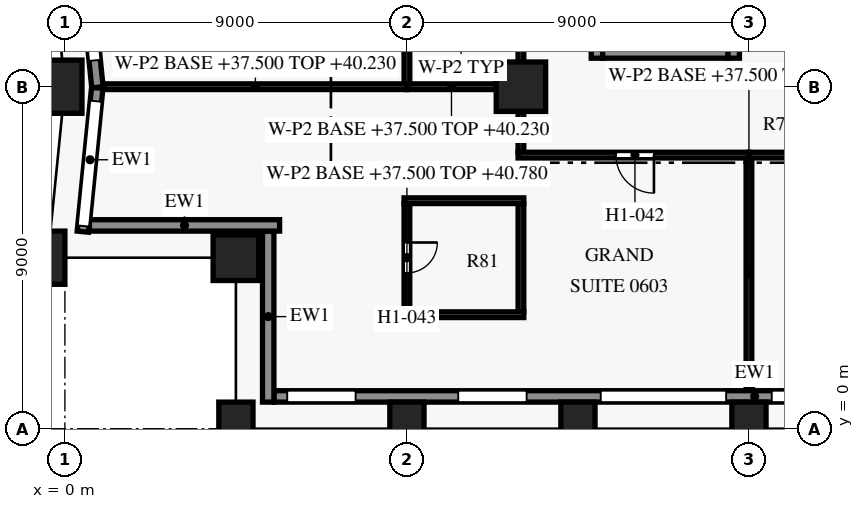
"""IFC4 building model, lengths in metres.
Left out: names, types, materials, properties, quantities, classifications, styles, units other than length and angle.
Written with IfcOpenShell. Run it as: python <this file> out.ifc"""

import sys

from ifc_helpers import new_model, si_unit, direction, frame, frame_2d, origin, origin_2d, place, context, subcontext, project, spatial, rectangle, extrude, element, fill, save


model = new_model("IFC4")
c1 = context("Model", 3, precision=1e-05, world=origin(), true_north=direction((0.0, 1.0)))
c2 = subcontext(c1, "Body", "Model", "MODEL_VIEW")
j1 = project(units=[si_unit("LENGTHUNIT", "METRE"), si_unit("PLANEANGLEUNIT", "RADIAN")], contexts=[c1])
p1 = place(None, origin())
s1 = spatial("IfcSite", under=j1, at=p1, CompositionType="ELEMENT")
p2 = place(p1, origin())
s2 = spatial("IfcBuilding", under=s1, at=p2, CompositionType="ELEMENT")
p3 = place(p2, frame((0.0, 0.0, 37.5)))
s3 = spatial("IfcBuildingStorey", under=s2, at=p3, CompositionType="ELEMENT", Elevation=37.5)
for number, where, z_axis, x_axis in (
    (1, (4.5, 0.0, 0.0), (0.0, 0.0, 1.0), (1.0, 0.0, 0.0)),
    (2, (9.0, 0.0, 0.0), (0.0, 0.0, 1.0), (1.0, 0.0, 0.0)),
    (3, (13.5, 0.0, 0.0), (0.0, 0.0, 1.0), (1.0, 0.0, 0.0)),
    (4, (18.0, 0.0, 0.0), (0.0, 0.0, 1.0), (1.0, 0.0, 0.0)),
    (5, (0.0, 9.0, 0.0), (0.0, 0.0, 1.0), (0.0, -1.0, 0.0)),
    (6, (-0.45, 4.5, 0.0), (0.0, 0.0, 1.0), (-0.1, -0.995, 0.0)),
):
    element("IfcColumn", number, at=place(p3, frame(where, z_axis=z_axis, x_axis=x_axis)), inside=s3, PredefinedType="COLUMN", context=c2, shape_type="SweptSolid", body=[
        extrude(rectangle(XDim=0.9, YDim=1.4, at=origin_2d()), origin(), (0.0, 0.0, 1.0), 3.6),
    ])
p4 = place(p3, frame((4.5, 4.5, 0.0), z_axis=(0.0, 0.0, 1.0), x_axis=(1.0, 0.0, 0.0)))
e7 = element("IfcColumn", 7, at=p4, inside=s3, PredefinedType="COLUMN", context=c2, shape_type="SweptSolid", body=[
    extrude(rectangle(XDim=1.2, YDim=1.2, at=origin_2d()), origin(), (0.0, 0.0, 1.0), 3.6),
])
p5 = place(p3, frame((12.0, 9.0, 0.0), z_axis=(0.0, 0.0, 1.0), x_axis=(1.0, 0.0, 0.0)))
e8 = element("IfcColumn", 8, at=p5, inside=s3, PredefinedType="COLUMN", context=c2, shape_type="SweptSolid", body=[
    extrude(rectangle(XDim=1.3, YDim=1.3, at=origin_2d()), origin(), (0.0, 0.0, 1.0), 3.6),
])
p6 = place(p3, frame((30.8, 0.85, 0.0), z_axis=(0.0, 0.0, 1.0), x_axis=(-1.0, 0.0, 0.0)))
e9 = element("IfcWall", 9, at=p6, inside=s3, PredefinedType="SOLIDWALL", context=c2, shape_type="SweptSolid", body=[
    extrude(rectangle(XDim=25.3, YDim=0.3, at=frame_2d((12.65, 0.0))), origin(), (0.0, 0.0, 1.0), 2.95),
])
p7 = place(p6, frame((0.65, 0.0, 0.75)))
e10 = element("IfcOpeningElement", 10, at=p7, cuts=e9, PredefinedType="OPENING", context=c2, shape_type="SweptSolid", body=[
    extrude(rectangle(XDim=1.8, YDim=1.8, at=frame_2d((0.9, 0.9))), frame((0.0, 0.16, 0.0), z_axis=(0.0, -1.0, 0.0), x_axis=(1.0, 0.0, 0.0)), (0.0, 0.0, 1.0), 0.32),
])
p8 = place(p6, frame((5.15, 0.0, 0.75)))
e11 = element("IfcOpeningElement", 11, at=p8, cuts=e9, PredefinedType="OPENING", context=c2, shape_type="SweptSolid", body=[
    extrude(rectangle(XDim=1.8, YDim=1.8, at=frame_2d((0.9, 0.9))), frame((0.0, 0.16, 0.0), z_axis=(0.0, -1.0, 0.0), x_axis=(1.0, 0.0, 0.0)), (0.0, 0.0, 1.0), 0.32),
])
p9 = place(p6, frame((8.9, 0.0, 0.15)))
e12 = element("IfcOpeningElement", 12, at=p9, cuts=e9, PredefinedType="OPENING", context=c2, shape_type="SweptSolid", body=[
    extrude(rectangle(XDim=3.3, YDim=2.4, at=frame_2d((1.65, 1.2))), frame((0.0, 0.16, 0.0), z_axis=(0.0, -1.0, 0.0), x_axis=(1.0, 0.0, 0.0)), (0.0, 0.0, 1.0), 0.32),
])
p10 = place(p6, frame((13.4, 0.0, 0.15)))
e13 = element("IfcOpeningElement", 13, at=p10, cuts=e9, PredefinedType="OPENING", context=c2, shape_type="SweptSolid", body=[
    extrude(rectangle(XDim=3.3, YDim=2.4, at=frame_2d((1.65, 1.2))), frame((0.0, 0.16, 0.0), z_axis=(0.0, -1.0, 0.0), x_axis=(1.0, 0.0, 0.0)), (0.0, 0.0, 1.0), 0.32),
])
p11 = place(p6, frame((18.65, 0.0, 0.75)))
e14 = element("IfcOpeningElement", 14, at=p11, cuts=e9, PredefinedType="OPENING", context=c2, shape_type="SweptSolid", body=[
    extrude(rectangle(XDim=1.8, YDim=1.8, at=frame_2d((0.9, 0.9))), frame((0.0, 0.16, 0.0), z_axis=(0.0, -1.0, 0.0), x_axis=(1.0, 0.0, 0.0)), (0.0, 0.0, 1.0), 0.32),
])
p12 = place(p6, frame((23.15, 0.0, 0.75)))
e15 = element("IfcOpeningElement", 15, at=p12, cuts=e9, PredefinedType="OPENING", context=c2, shape_type="SweptSolid", body=[
    extrude(rectangle(XDim=1.8, YDim=1.8, at=frame_2d((0.9, 0.9))), frame((0.0, 0.16, 0.0), z_axis=(0.0, -1.0, 0.0), x_axis=(1.0, 0.0, 0.0)), (0.0, 0.0, 1.0), 0.32),
])
p13 = place(p3, frame((0.856, 8.985, 0.0), z_axis=(0.0, 0.0, 1.0), x_axis=(-0.099495688264, 0.995037993253, 0.0)))
e16 = element("IfcWall", 16, at=p13, inside=s3, PredefinedType="SOLIDWALL", context=c2, shape_type="SweptSolid", body=[
    extrude(rectangle(XDim=9.03, YDim=0.3, at=frame_2d((4.515, 0.0))), origin(), (0.0, 0.0, 1.0), 2.95),
])
p14 = place(p13, frame((0.711, 0.0, 0.15)))
e17 = element("IfcOpeningElement", 17, at=p14, cuts=e16, PredefinedType="OPENING", context=c2, shape_type="SweptSolid", body=[
    extrude(rectangle(XDim=3.3, YDim=2.4, at=frame_2d((1.65, 1.2))), frame((0.0, 0.16, 0.0), z_axis=(0.0, -1.0, 0.0), x_axis=(1.0, 0.0, 0.0)), (0.0, 0.0, 1.0), 0.32),
])
p15 = place(p13, frame((5.984, 0.0, 0.75)))
e18 = element("IfcOpeningElement", 18, at=p15, cuts=e16, PredefinedType="OPENING", context=c2, shape_type="SweptSolid", body=[
    extrude(rectangle(XDim=1.8, YDim=1.8, at=frame_2d((0.9, 0.9))), frame((0.0, 0.16, 0.0), z_axis=(0.0, -1.0, 0.0), x_axis=(1.0, 0.0, 0.0)), (0.0, 0.0, 1.0), 0.32),
])
p16 = place(p3, frame((0.473, 5.185, 0.0), z_axis=(0.0, 0.0, 1.0), x_axis=(0.099541845169, 0.995033376857, 0.0)))
e19 = element("IfcWall", 19, at=p16, inside=s3, PredefinedType="SOLIDWALL", context=c2, shape_type="SweptSolid", body=[
    extrude(rectangle(XDim=3.804, YDim=0.3, at=frame_2d((1.902, 0.0))), origin(), (0.0, 0.0, 1.0), 2.95),
])
p17 = place(p16, frame((0.15, 0.0, 0.15)))
e20 = element("IfcOpeningElement", 20, at=p17, cuts=e19, PredefinedType="OPENING", context=c2, shape_type="SweptSolid", body=[
    extrude(rectangle(XDim=3.3, YDim=2.4, at=frame_2d((1.65, 1.2))), frame((0.0, 0.16, 0.0), z_axis=(0.0, -1.0, 0.0), x_axis=(1.0, 0.0, 0.0)), (0.0, 0.0, 1.0), 0.32),
])
p18 = place(p3, frame((5.65, 5.35, 0.0), z_axis=(0.0, 0.0, 1.0), x_axis=(-1.0, 0.0, 0.0)))
e21 = element("IfcWall", 21, at=p18, inside=s3, PredefinedType="SOLIDWALL", context=c2, shape_type="SweptSolid", body=[
    extrude(rectangle(XDim=5.005, YDim=0.3, at=frame_2d((2.502, 0.0))), origin(), (0.0, 0.0, 1.0), 2.95),
])
p19 = place(p3, frame((5.35, 0.7, 0.0), z_axis=(0.0, 0.0, 1.0), x_axis=(0.0, 1.0, 0.0)))
e22 = element("IfcWall", 22, at=p19, inside=s3, PredefinedType="SOLIDWALL", context=c2, shape_type="SweptSolid", body=[
    extrude(rectangle(XDim=4.5, YDim=0.3, at=frame_2d((2.25, 0.0))), origin(), (0.0, 0.0, 1.0), 2.95),
])
p20 = place(p3, frame((14.15, 9.9, 0.0), z_axis=(0.0, 0.0, 1.0), x_axis=(1.0, 0.0, 0.0)))
e23 = element("IfcWall", 23, at=p20, inside=s3, PredefinedType="SHEAR", context=c2, shape_type="SweptSolid", body=[
    extrude(rectangle(XDim=3.3, YDim=0.3, at=frame_2d((1.65, 0.0))), origin(), (0.0, 0.0, 1.0), 3.3),
])
p21 = place(p3, frame((14.0, 9.75, 0.0), z_axis=(0.0, 0.0, 1.0), x_axis=(0.0, 1.0, 0.0)))
e24 = element("IfcWall", 24, at=p21, inside=s3, PredefinedType="SHEAR", context=c2, shape_type="SweptSolid", body=[
    extrude(rectangle(XDim=8.3, YDim=0.3, at=frame_2d((4.15, 0.0))), origin(), (0.0, 0.0, 1.0), 3.3),
])
p22 = place(p3, frame((17.6, 9.75, 0.0), z_axis=(0.0, 0.0, 1.0), x_axis=(0.0, 1.0, 0.0)))
e25 = element("IfcWall", 25, at=p22, inside=s3, PredefinedType="SHEAR", context=c2, shape_type="SweptSolid", body=[
    extrude(rectangle(XDim=8.3, YDim=0.3, at=frame_2d((4.15, 0.0))), origin(), (0.0, 0.0, 1.0), 3.3),
])
p23 = place(p22, frame((0.65, 0.0, 0.0)))
e26 = element("IfcOpeningElement", 26, at=p23, cuts=e25, PredefinedType="OPENING", context=c2, shape_type="SweptSolid", body=[
    extrude(rectangle(XDim=1.2, YDim=2.2, at=frame_2d((0.6, 1.1))), frame((0.0, 0.16, 0.0), z_axis=(0.0, -1.0, 0.0), x_axis=(1.0, 0.0, 0.0)), (0.0, 0.0, 1.0), 0.32),
])
p24 = place(p3, frame((8.925, 3.0, 0.0), z_axis=(0.0, 0.0, 1.0), x_axis=(1.0, 0.0, 0.0)))
e27 = element("IfcWall", 27, at=p24, inside=s3, PredefinedType="PARTITIONING", context=c2, shape_type="SweptSolid", body=[
    extrude(rectangle(XDim=3.15, YDim=0.15, at=frame_2d((1.575, 0.0))), origin(), (0.0, 0.0, 1.0), 2.58),
])
p25 = place(p3, frame((12.0, 3.075, 0.0), z_axis=(0.0, 0.0, 1.0), x_axis=(0.0, 1.0, 0.0)))
e28 = element("IfcWall", 28, at=p25, inside=s3, PredefinedType="PARTITIONING", context=c2, shape_type="SweptSolid", body=[
    extrude(rectangle(XDim=2.85, YDim=0.15, at=frame_2d((1.425, 0.0))), origin(), (0.0, 0.0, 1.0), 2.58),
])
p26 = place(p3, frame((9.0, 5.925, 0.0), z_axis=(0.0, 0.0, 1.0), x_axis=(0.0, -1.0, 0.0)))
e29 = element("IfcWall", 29, at=p26, inside=s3, PredefinedType="PARTITIONING", context=c2, shape_type="SweptSolid", body=[
    extrude(rectangle(XDim=2.85, YDim=0.15, at=frame_2d((1.425, 0.0))), origin(), (0.0, 0.0, 1.0), 3.28),
])
p27 = place(p26, frame((1.025, 0.0, 0.0)))
e30 = element("IfcOpeningElement", 30, at=p27, cuts=e29, PredefinedType="OPENING", context=c2, shape_type="SweptSolid", body=[
    extrude(rectangle(XDim=0.8, YDim=2.1, at=frame_2d((0.4, 1.05))), frame((0.0, 0.085, 0.0), z_axis=(0.0, -1.0, 0.0), x_axis=(1.0, 0.0, 0.0)), (0.0, 0.0, 1.0), 0.17),
])
p28 = place(p3, frame((12.075, 6.0, 0.0), z_axis=(0.0, 0.0, 1.0), x_axis=(-1.0, 0.0, 0.0)))
e31 = element("IfcWall", 31, at=p28, inside=s3, PredefinedType="PARTITIONING", context=c2, shape_type="SweptSolid", body=[
    extrude(rectangle(XDim=3.15, YDim=0.15, at=frame_2d((1.575, 0.0))), origin(), (0.0, 0.0, 1.0), 2.58),
])
p29 = place(p3, frame((18.0, 7.125, 0.0), z_axis=(0.0, 0.0, 1.0), x_axis=(0.0, -1.0, 0.0)))
e32 = element("IfcWall", 32, at=p29, inside=s3, PredefinedType="PARTITIONING", context=c2, shape_type="SweptSolid", body=[
    extrude(rectangle(XDim=6.105, YDim=0.15, at=frame_2d((3.052, 0.0))), origin(), (0.0, 0.0, 1.0), 3.28),
])
p30 = place(p3, frame((18.0, 7.2, 0.0), z_axis=(0.0, 0.0, 1.0), x_axis=(-1.0, 0.0, 0.0)))
e33 = element("IfcWall", 33, at=p30, inside=s3, PredefinedType="PARTITIONING", context=c2, shape_type="SweptSolid", body=[
    extrude(rectangle(XDim=6.075, YDim=0.15, at=frame_2d((3.038, 0.0))), origin(), (0.0, 0.0, 1.0), 2.58),
])
p31 = place(p30, frame((2.5, 0.0, 0.0)))
e34 = element("IfcOpeningElement", 34, at=p31, cuts=e33, PredefinedType="OPENING", context=c2, shape_type="SweptSolid", body=[
    extrude(rectangle(XDim=1.0, YDim=2.1, at=frame_2d((0.5, 1.05))), frame((0.0, 0.085, 0.0), z_axis=(0.0, -1.0, 0.0), x_axis=(1.0, 0.0, 0.0)), (0.0, 0.0, 1.0), 0.17),
])
p32 = place(p3, frame((24.075, 7.2, 0.0), z_axis=(0.0, 0.0, 1.0), x_axis=(-1.0, 0.0, 0.0)))
e35 = element("IfcWall", 35, at=p32, inside=s3, PredefinedType="PARTITIONING", context=c2, shape_type="SweptSolid", body=[
    extrude(rectangle(XDim=6.075, YDim=0.15, at=frame_2d((3.038, 0.0))), origin(), (0.0, 0.0, 1.0), 2.58),
])
p33 = place(p32, frame((2.575, 0.0, 0.0)))
e36 = element("IfcOpeningElement", 36, at=p33, cuts=e35, PredefinedType="OPENING", context=c2, shape_type="SweptSolid", body=[
    extrude(rectangle(XDim=1.0, YDim=2.1, at=frame_2d((0.5, 1.05))), frame((0.0, 0.085, 0.0), z_axis=(0.0, -1.0, 0.0), x_axis=(1.0, 0.0, 0.0)), (0.0, 0.0, 1.0), 0.17),
])
p34 = place(p3, frame((12.0, 7.275, 0.0), z_axis=(0.0, 0.0, 1.0), x_axis=(0.0, 1.0, 0.0)))
e37 = element("IfcWall", 37, at=p34, inside=s3, PredefinedType="PARTITIONING", context=c2, shape_type="SweptSolid", body=[
    extrude(rectangle(XDim=1.07, YDim=0.15, at=frame_2d((0.535, 0.0))), origin(), (0.0, 0.0, 1.0), 2.58),
])
p35 = place(p3, frame((9.0, 9.0, 0.0), z_axis=(0.0, 0.0, 1.0), x_axis=(-1.0, 0.0, 0.0)))
e38 = element("IfcWall", 38, at=p35, inside=s3, PredefinedType="PARTITIONING", context=c2, shape_type="SweptSolid", body=[
    extrude(rectangle(XDim=7.975, YDim=0.15, at=frame_2d((3.988, 0.0))), origin(), (0.0, 0.0, 1.0), 2.73),
])
p36 = place(p3, frame((11.345, 9.0, 0.0), z_axis=(0.0, 0.0, 1.0), x_axis=(-1.0, 0.0, 0.0)))
e39 = element("IfcWall", 39, at=p36, inside=s3, PredefinedType="PARTITIONING", context=c2, shape_type="SweptSolid", body=[
    extrude(rectangle(XDim=2.345, YDim=0.15, at=frame_2d((1.172, 0.0))), origin(), (0.0, 0.0, 1.0), 2.73),
])
p37 = place(p3, frame((12.0, 9.655, 0.0), z_axis=(0.0, 0.0, 1.0), x_axis=(0.0, 1.0, 0.0)))
e40 = element("IfcWall", 40, at=p37, inside=s3, PredefinedType="PARTITIONING", context=c2, shape_type="SweptSolid", body=[
    extrude(rectangle(XDim=1.37, YDim=0.15, at=frame_2d((0.685, 0.0))), origin(), (0.0, 0.0, 1.0), 2.58),
])
p38 = place(p3, frame((9.0, 11.025, 0.0), z_axis=(0.0, 0.0, 1.0), x_axis=(0.0, -1.0, 0.0)))
e41 = element("IfcWall", 41, at=p38, inside=s3, PredefinedType="PARTITIONING", context=c2, shape_type="SweptSolid", body=[
    extrude(rectangle(XDim=1.95, YDim=0.15, at=frame_2d((0.975, 0.0))), origin(), (0.0, 0.0, 1.0), 2.73),
])
p39 = place(p9, origin())
e42 = element("IfcWindow", 42, at=p39, inside=s3, PartitioningType="SINGLE_PANEL", PredefinedType="WINDOW", context=c2, shape_type="SweptSolid", body=[
    extrude(rectangle(XDim=3.3, YDim=2.4, at=frame_2d((1.65, 1.2))), frame((0.0, 0.03, 0.0), z_axis=(0.0, -1.0, 0.0), x_axis=(1.0, 0.0, 0.0)), (0.0, 0.0, 1.0), 0.06),
])
fill(e12, e42)
p40 = place(p10, origin())
e43 = element("IfcWindow", 43, at=p40, inside=s3, PartitioningType="SINGLE_PANEL", PredefinedType="WINDOW", context=c2, shape_type="SweptSolid", body=[
    extrude(rectangle(XDim=3.3, YDim=2.4, at=frame_2d((1.65, 1.2))), frame((0.0, 0.03, 0.0), z_axis=(0.0, -1.0, 0.0), x_axis=(1.0, 0.0, 0.0)), (0.0, 0.0, 1.0), 0.06),
])
fill(e13, e43)
p41 = place(p11, origin())
e44 = element("IfcWindow", 44, at=p41, inside=s3, PartitioningType="SINGLE_PANEL", PredefinedType="WINDOW", context=c2, shape_type="SweptSolid", body=[
    extrude(rectangle(XDim=1.8, YDim=1.8, at=frame_2d((0.9, 0.9))), frame((0.0, 0.03, 0.0), z_axis=(0.0, -1.0, 0.0), x_axis=(1.0, 0.0, 0.0)), (0.0, 0.0, 1.0), 0.06),
])
fill(e14, e44)
p42 = place(p12, origin())
e45 = element("IfcWindow", 45, at=p42, inside=s3, PartitioningType="SINGLE_PANEL", PredefinedType="WINDOW", context=c2, shape_type="SweptSolid", body=[
    extrude(rectangle(XDim=1.8, YDim=1.8, at=frame_2d((0.9, 0.9))), frame((0.0, 0.03, 0.0), z_axis=(0.0, -1.0, 0.0), x_axis=(1.0, 0.0, 0.0)), (0.0, 0.0, 1.0), 0.06),
])
fill(e15, e45)
p43 = place(p14, origin())
e46 = element("IfcWindow", 46, at=p43, inside=s3, PartitioningType="SINGLE_PANEL", PredefinedType="WINDOW", context=c2, shape_type="SweptSolid", body=[
    extrude(rectangle(XDim=3.3, YDim=2.4, at=frame_2d((1.65, 1.2))), frame((0.0, 0.03, 0.0), z_axis=(0.0, -1.0, 0.0), x_axis=(1.0, 0.0, 0.0)), (0.0, 0.0, 1.0), 0.06),
])
fill(e17, e46)
p44 = place(p17, origin())
e47 = element("IfcWindow", 47, at=p44, inside=s3, PartitioningType="SINGLE_PANEL", PredefinedType="WINDOW", context=c2, shape_type="SweptSolid", body=[
    extrude(rectangle(XDim=3.3, YDim=2.4, at=frame_2d((1.65, 1.2))), frame((0.0, 0.03, 0.0), z_axis=(0.0, -1.0, 0.0), x_axis=(1.0, 0.0, 0.0)), (0.0, 0.0, 1.0), 0.06),
])
fill(e20, e47)
p45 = place(p31, origin())
e48 = element("IfcDoor", 48, at=p45, inside=s3, OperationType="SINGLE_SWING_LEFT", PredefinedType="DOOR", context=c2, shape_type="SweptSolid", body=[
    extrude(rectangle(XDim=1.0, YDim=2.1, at=frame_2d((0.5, 1.05))), frame((0.0, 0.025, 0.0), z_axis=(0.0, -1.0, 0.0), x_axis=(1.0, 0.0, 0.0)), (0.0, 0.0, 1.0), 0.05),
])
fill(e34, e48)
p46 = place(p27, origin())
e49 = element("IfcDoor", 49, at=p46, inside=s3, OperationType="SINGLE_SWING_RIGHT", PredefinedType="DOOR", context=c2, shape_type="SweptSolid", body=[
    extrude(rectangle(XDim=0.8, YDim=2.1, at=frame_2d((0.4, 1.05))), frame((0.0, 0.025, 0.0), z_axis=(0.0, -1.0, 0.0), x_axis=(1.0, 0.0, 0.0)), (0.0, 0.0, 1.0), 0.05),
])
fill(e30, e49)
save(model, sys.argv[1])
